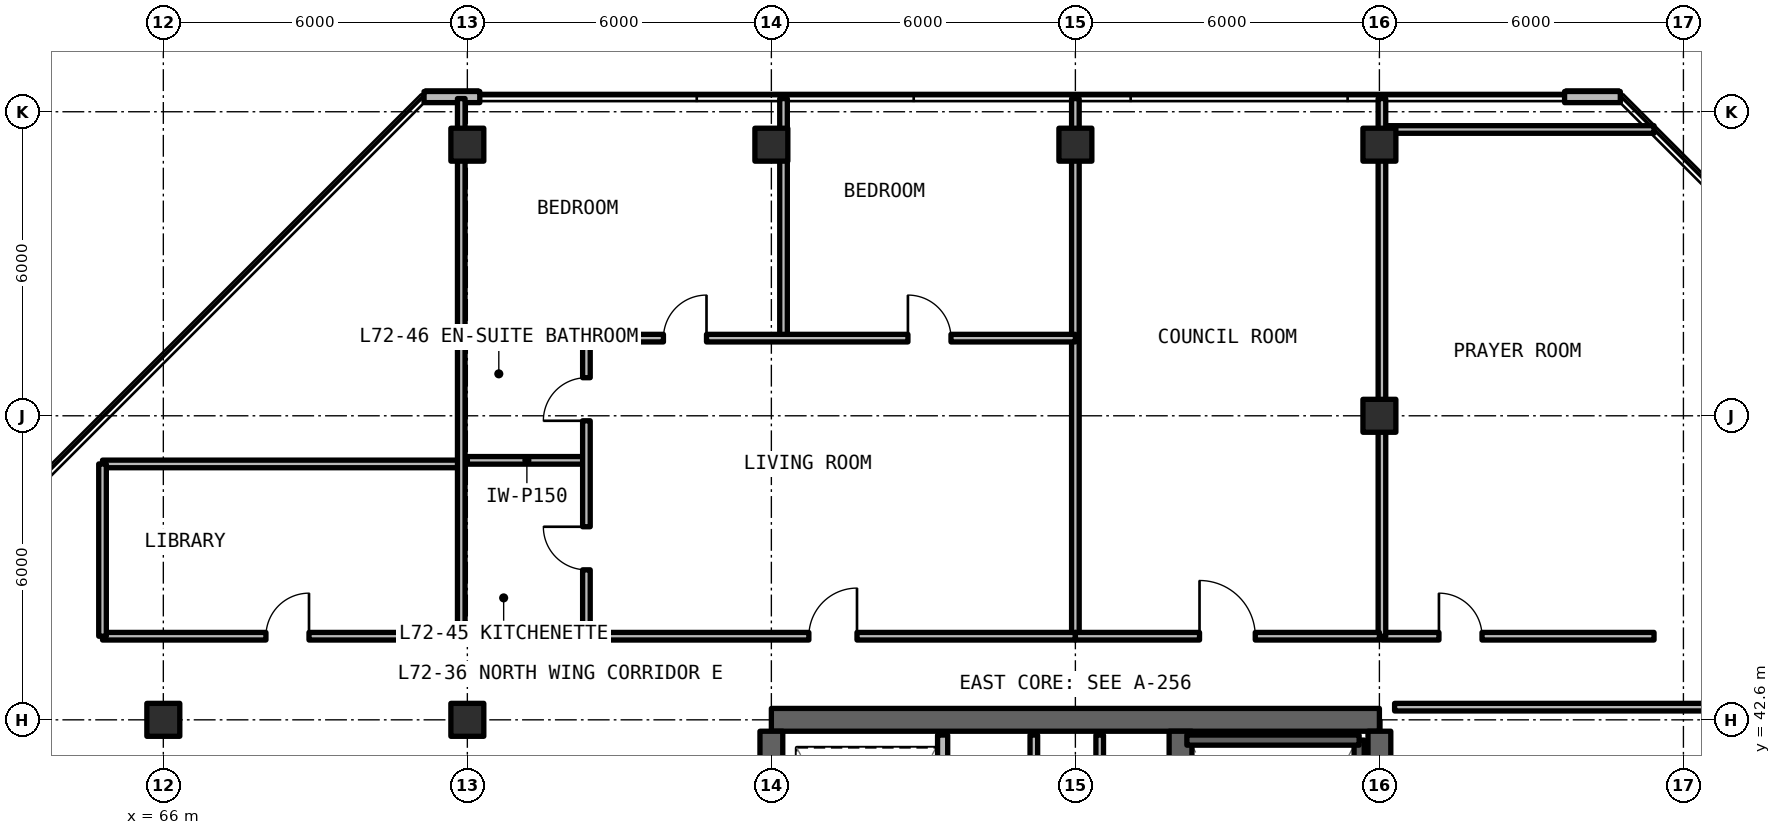
"""IFC4 building model, lengths in metres.
Left out: names, types, materials, properties, quantities, classifications, styles, units other than length and angle.
Written with IfcOpenShell. Run it as: python <this file> out.ifc"""

import sys

from ifc_helpers import new_model, si_unit, direction, frame, frame_2d, origin, origin_2d, place, context, subcontext, project, spatial, rectangle, extrude, element, fill, save


model = new_model("IFC4")
c1 = context("Model", 3, precision=1e-05, world=origin(), true_north=direction((0.0, 1.0)))
c2 = subcontext(c1, "Body", "Model", "MODEL_VIEW")
j1 = project(units=[si_unit("LENGTHUNIT", "METRE"), si_unit("PLANEANGLEUNIT", "RADIAN")], contexts=[c1])
p1 = place(None, origin())
s1 = spatial("IfcSite", under=j1, at=p1, CompositionType="ELEMENT")
p2 = place(p1, origin())
s2 = spatial("IfcBuilding", under=s1, at=p2, CompositionType="ELEMENT")
p3 = place(p2, frame((0.0, 0.0, 257.07)))
s3 = spatial("IfcBuildingStorey", under=s2, at=p3, CompositionType="ELEMENT", Elevation=257.07)
p4 = place(p3, frame((90.0, 42.6, 0.0), z_axis=(0.0, 0.0, 1.0), x_axis=(-1.0, 0.0, 0.0)))
e1 = element("IfcWall", 1, at=p4, inside=s3, PredefinedType="SHEAR", context=c2, shape_type="SweptSolid", body=[
    extrude(rectangle(XDim=12.0, YDim=0.45, at=frame_2d((6.0, 0.0))), origin(), (0.0, 0.0, 1.0), 3.63),
])
p5 = place(p3, frame((90.0, 24.825, 0.0), z_axis=(0.0, 0.0, 1.0), x_axis=(0.0, 1.0, 0.0)))
e2 = element("IfcWall", 2, at=p5, inside=s3, PredefinedType="SHEAR", context=c2, shape_type="SweptSolid", body=[
    extrude(rectangle(XDim=17.55, YDim=0.45, at=frame_2d((8.775, 0.0))), origin(), (0.0, 0.0, 1.0), 3.63),
])
p6 = place(p3, frame((78.0, 36.8, 0.0), z_axis=(0.0, 0.0, 1.0), x_axis=(0.0, 1.0, 0.0)))
e3 = element("IfcWall", 3, at=p6, inside=s3, PredefinedType="SHEAR", context=c2, shape_type="SweptSolid", body=[
    extrude(rectangle(XDim=5.575, YDim=0.45, at=frame_2d((2.788, 0.0))), origin(), (0.0, 0.0, 1.0), 3.63),
])
p7 = place(p3, frame((86.075, 24.825, 0.0), z_axis=(0.0, 0.0, 1.0), x_axis=(0.0, 1.0, 0.0)))
e4 = element("IfcWall", 4, at=p7, inside=s3, PredefinedType="SHEAR", context=c2, shape_type="SweptSolid", body=[
    extrude(rectangle(XDim=17.55, YDim=0.45, at=frame_2d((8.775, 0.0))), origin(), (0.0, 0.0, 1.0), 3.63),
])
p8 = place(p7, frame((0.425, 0.0, 0.0)))
e5 = element("IfcOpeningElement", 5, at=p8, cuts=e4, PredefinedType="OPENING", context=c2, shape_type="SweptSolid", body=[
    extrude(rectangle(XDim=1.15, YDim=2.15, at=frame_2d((0.575, 1.075))), frame((0.0, 0.235, 0.0), z_axis=(0.0, -1.0, 0.0), x_axis=(1.0, 0.0, 0.0)), (0.0, 0.0, 1.0), 0.47),
])
p9 = place(p7, frame((9.625, 0.0, 0.0)))
e6 = element("IfcOpeningElement", 6, at=p9, cuts=e4, PredefinedType="OPENING", context=c2, shape_type="SweptSolid", body=[
    extrude(rectangle(XDim=1.15, YDim=2.15, at=frame_2d((0.575, 1.075))), frame((0.0, 0.235, 0.0), z_axis=(0.0, -1.0, 0.0), x_axis=(1.0, 0.0, 0.0)), (0.0, 0.0, 1.0), 0.47),
])
for number, where, z_axis, x_axis in (
    (7, (66.0, 42.6, 0.0), (0.0, 0.0, 1.0), (1.0, 0.0, 0.0)),
    (8, (72.0, 42.6, 0.0), (0.0, 0.0, 1.0), (1.0, 0.0, 0.0)),
    (9, (90.0, 48.6, 0.0), (0.0, 0.0, 1.0), (1.0, 0.0, 0.0)),
    (10, (72.0, 53.95, 0.0), (0.0, 0.0, 1.0), (1.0, 0.0, 0.0)),
    (11, (78.0, 53.95, 0.0), (0.0, 0.0, 1.0), (1.0, 0.0, 0.0)),
    (12, (84.0, 53.95, 0.0), (0.0, 0.0, 1.0), (1.0, 0.0, 0.0)),
    (13, (90.0, 53.95, 0.0), (0.0, 0.0, 1.0), (1.0, 0.0, 0.0)),
):
    element("IfcColumn", number, at=place(p3, frame(where, z_axis=z_axis, x_axis=x_axis)), inside=s3, PredefinedType="COLUMN", context=c2, shape_type="SweptSolid", body=[
        extrude(rectangle(XDim=0.65, YDim=0.65, at=origin_2d()), origin(), (0.0, 0.0, 1.0), 3.63),
    ])
for number, where, z_axis, x_axis in (
    (14, (94.754, 54.89, 0.0), (0.0, 0.0, 1.0), (-1.0, 0.0, 0.0)),
    (15, (72.246, 54.89, 0.0), (0.0, 0.0, 1.0), (-1.0, 0.0, 0.0)),
):
    element("IfcWall", number, at=place(p3, frame(where, z_axis=z_axis, x_axis=x_axis)), inside=s3, PredefinedType="SOLIDWALL", context=c2, shape_type="SweptSolid", body=[
        extrude(rectangle(XDim=1.1, YDim=0.22, at=frame_2d((0.55, 0.0))), origin(), (0.0, 0.0, 1.0), 3.41),
    ])
p10 = place(p3, frame((84.48, 36.88, 0.0), z_axis=(0.0, 0.0, 1.0), x_axis=(0.0, 1.0, 0.0)))
e16 = element("IfcWall", 16, at=p10, inside=s3, PredefinedType="SOLIDWALL", context=c2, shape_type="SweptSolid", body=[
    extrude(rectangle(XDim=5.42, YDim=0.15, at=frame_2d((2.71, 0.0))), origin(), (0.0, 0.0, 1.0), 2.63),
])
p11 = place(p3, frame((83.18, 36.88, 0.0), z_axis=(0.0, 0.0, 1.0), x_axis=(0.0, 1.0, 0.0)))
e17 = element("IfcWall", 17, at=p11, inside=s3, PredefinedType="SOLIDWALL", context=c2, shape_type="SweptSolid", body=[
    extrude(rectangle(XDim=5.42, YDim=0.15, at=frame_2d((2.71, 0.0))), origin(), (0.0, 0.0, 1.0), 2.63),
])
p12 = place(p11, frame((2.1, 0.0, 0.0)))
e18 = element("IfcOpeningElement", 18, at=p12, cuts=e17, PredefinedType="OPENING", context=c2, shape_type="SweptSolid", body=[
    extrude(rectangle(XDim=0.95, YDim=2.15, at=frame_2d((0.475, 1.075))), frame((0.0, 0.085, 0.0), z_axis=(0.0, -1.0, 0.0), x_axis=(1.0, 0.0, 0.0)), (0.0, 0.0, 1.0), 0.17),
])
p13 = place(p3, frame((81.38, 36.88, 0.0), z_axis=(0.0, 0.0, 1.0), x_axis=(0.0, 1.0, 0.0)))
e19 = element("IfcWall", 19, at=p13, inside=s3, PredefinedType="SOLIDWALL", context=c2, shape_type="SweptSolid", body=[
    extrude(rectangle(XDim=5.42, YDim=0.2, at=frame_2d((2.71, 0.0))), origin(), (0.0, 0.0, 1.0), 2.63),
])
p14 = place(p13, frame((0.8, 0.0, 0.0)))
e20 = element("IfcOpeningElement", 20, at=p14, cuts=e19, PredefinedType="OPENING", context=c2, shape_type="SweptSolid", body=[
    extrude(rectangle(XDim=1.1, YDim=2.2, at=frame_2d((0.55, 1.1))), frame((0.0, 0.11, 0.0), z_axis=(0.0, -1.0, 0.0), x_axis=(1.0, 0.0, 0.0)), (0.0, 0.0, 1.0), 0.22),
])
p15 = place(p13, frame((3.3, 0.0, 0.0)))
e21 = element("IfcOpeningElement", 21, at=p15, cuts=e19, PredefinedType="OPENING", context=c2, shape_type="SweptSolid", body=[
    extrude(rectangle(XDim=1.1, YDim=2.2, at=frame_2d((0.55, 1.1))), frame((0.0, 0.11, 0.0), z_axis=(0.0, -1.0, 0.0), x_axis=(1.0, 0.0, 0.0)), (0.0, 0.0, 1.0), 0.22),
])
p16 = place(p3, frame((64.8, 44.25, 0.0), z_axis=(0.0, 0.0, 1.0), x_axis=(1.0, 0.0, 0.0)))
e22 = element("IfcWall", 22, at=p16, inside=s3, PredefinedType="SOLIDWALL", context=c2, shape_type="SweptSolid", body=[
    extrude(rectangle(XDim=7.08, YDim=0.15, at=frame_2d((3.54, 0.0))), origin(), (0.0, 0.0, 1.0), 2.63),
])
p17 = place(p16, frame((3.225, 0.0, 0.0)))
e23 = element("IfcOpeningElement", 23, at=p17, cuts=e22, PredefinedType="OPENING", context=c2, shape_type="SweptSolid", body=[
    extrude(rectangle(XDim=0.85, YDim=2.1, at=frame_2d((0.425, 1.05))), frame((0.0, 0.085, 0.0), z_axis=(0.0, -1.0, 0.0), x_axis=(1.0, 0.0, 0.0)), (0.0, 0.0, 1.0), 0.17),
])
p18 = place(p3, frame((64.8, 47.65, 0.0), z_axis=(0.0, 0.0, 1.0), x_axis=(1.0, 0.0, 0.0)))
e24 = element("IfcWall", 24, at=p18, inside=s3, PredefinedType="SOLIDWALL", context=c2, shape_type="SweptSolid", body=[
    extrude(rectangle(XDim=7.08, YDim=0.15, at=frame_2d((3.54, 0.0))), origin(), (0.0, 0.0, 1.0), 2.63),
])
p19 = place(p3, frame((64.8, 44.25, 0.0), z_axis=(0.0, 0.0, 1.0), x_axis=(0.0, 1.0, 0.0)))
e25 = element("IfcWall", 25, at=p19, inside=s3, PredefinedType="SOLIDWALL", context=c2, shape_type="SweptSolid", body=[
    extrude(rectangle(XDim=3.4, YDim=0.15, at=frame_2d((1.7, 0.0))), origin(), (0.0, 0.0, 1.0), 2.63),
])
p20 = place(p3, frame((71.88, 44.25, 0.0), z_axis=(0.0, 0.0, 1.0), x_axis=(0.0, 1.0, 0.0)))
e26 = element("IfcWall", 26, at=p20, inside=s3, PredefinedType="SOLIDWALL", context=c2, shape_type="SweptSolid", body=[
    extrude(rectangle(XDim=10.61, YDim=0.15, at=frame_2d((5.305, 0.0))), origin(), (0.0, 0.0, 1.0), 2.63),
])
p21 = place(p3, frame((90.3, 42.85, 0.0), z_axis=(0.0, 0.0, 1.0), x_axis=(1.0, 0.0, 0.0)))
e27 = element("IfcWall", 27, at=p21, inside=s3, PredefinedType="SOLIDWALL", context=c2, shape_type="SweptSolid", body=[
    extrude(rectangle(XDim=8.52, YDim=0.15, at=frame_2d((4.26, 0.0))), origin(), (0.0, 0.0, 1.0), 2.63),
])
p22 = place(p3, frame((90.05, 44.25, 0.0), z_axis=(0.0, 0.0, 1.0), x_axis=(1.0, 0.0, 0.0)))
e28 = element("IfcWall", 28, at=p22, inside=s3, PredefinedType="SOLIDWALL", context=c2, shape_type="SweptSolid", body=[
    extrude(rectangle(XDim=5.37, YDim=0.15, at=frame_2d((2.685, 0.0))), origin(), (0.0, 0.0, 1.0), 2.63),
])
p23 = place(p22, frame((1.125, 0.0, 0.0)))
e29 = element("IfcOpeningElement", 29, at=p23, cuts=e28, PredefinedType="OPENING", context=c2, shape_type="SweptSolid", body=[
    extrude(rectangle(XDim=0.85, YDim=2.1, at=frame_2d((0.425, 1.05))), frame((0.0, 0.085, 0.0), z_axis=(0.0, -1.0, 0.0), x_axis=(1.0, 0.0, 0.0)), (0.0, 0.0, 1.0), 0.17),
])
p24 = place(p3, frame((90.05, 54.25, 0.0), z_axis=(0.0, 0.0, 1.0), x_axis=(1.0, 0.0, 0.0)))
e30 = element("IfcWall", 30, at=p24, inside=s3, PredefinedType="SOLIDWALL", context=c2, shape_type="SweptSolid", body=[
    extrude(rectangle(XDim=5.37, YDim=0.15, at=frame_2d((2.685, 0.0))), origin(), (0.0, 0.0, 1.0), 2.63),
])
for number, where, z_axis, x_axis in (
    (31, (90.05, 44.25, 0.0), (0.0, 0.0, 1.0), (0.0, 1.0, 0.0)),
    (32, (84.0, 44.25, 0.0), (0.0, 0.0, 1.0), (0.0, 1.0, 0.0)),
):
    element("IfcWall", number, at=place(p3, frame(where, z_axis=z_axis, x_axis=x_axis)), inside=s3, PredefinedType="SOLIDWALL", context=c2, shape_type="SweptSolid", body=[
        extrude(rectangle(XDim=10.61, YDim=0.15, at=frame_2d((5.305, 0.0))), origin(), (0.0, 0.0, 1.0), 2.63),
    ])
p25 = place(p3, frame((72.0, 47.721, 0.0), z_axis=(0.0, 0.0, 1.0), x_axis=(1.0, 0.0, 0.0)))
e33 = element("IfcWall", 33, at=p25, inside=s3, PredefinedType="PARTITIONING", context=c2, shape_type="SweptSolid", body=[
    extrude(rectangle(XDim=2.35, YDim=0.15, at=frame_2d((1.175, 0.0))), origin(), (0.0, 0.0, 1.0), 2.63),
])
p26 = place(p3, frame((74.35, 44.25, 0.0), z_axis=(0.0, 0.0, 1.0), x_axis=(0.0, 1.0, 0.0)))
e34 = element("IfcWall", 34, at=p26, inside=s3, PredefinedType="PARTITIONING", context=c2, shape_type="SweptSolid", body=[
    extrude(rectangle(XDim=5.882, YDim=0.15, at=frame_2d((2.941, 0.0))), origin(), (0.0, 0.0, 1.0), 2.63),
])
p27 = place(p26, frame((1.31, 0.0, 0.0)))
e35 = element("IfcOpeningElement", 35, at=p27, cuts=e34, PredefinedType="OPENING", context=c2, shape_type="SweptSolid", body=[
    extrude(rectangle(XDim=0.85, YDim=2.1, at=frame_2d((0.425, 1.05))), frame((0.0, 0.085, 0.0), z_axis=(0.0, -1.0, 0.0), x_axis=(1.0, 0.0, 0.0)), (0.0, 0.0, 1.0), 0.17),
])
p28 = place(p26, frame((4.251, 0.0, 0.0)))
e36 = element("IfcOpeningElement", 36, at=p28, cuts=e34, PredefinedType="OPENING", context=c2, shape_type="SweptSolid", body=[
    extrude(rectangle(XDim=0.85, YDim=2.1, at=frame_2d((0.425, 1.05))), frame((0.0, 0.085, 0.0), z_axis=(0.0, -1.0, 0.0), x_axis=(1.0, 0.0, 0.0)), (0.0, 0.0, 1.0), 0.17),
])
p29 = place(p3, frame((78.24, 50.132, 0.0), z_axis=(0.0, 0.0, 1.0), x_axis=(0.0, 1.0, 0.0)))
e37 = element("IfcWall", 37, at=p29, inside=s3, PredefinedType="PARTITIONING", context=c2, shape_type="SweptSolid", body=[
    extrude(rectangle(XDim=4.728, YDim=0.15, at=frame_2d((2.364, 0.0))), origin(), (0.0, 0.0, 1.0), 2.63),
])
p30 = place(p3, frame((72.0, 50.132, 0.0), z_axis=(0.0, 0.0, 1.0), x_axis=(1.0, 0.0, 0.0)))
e38 = element("IfcWall", 38, at=p30, inside=s3, PredefinedType="PARTITIONING", context=c2, shape_type="SweptSolid", body=[
    extrude(rectangle(XDim=12.0, YDim=0.15, at=frame_2d((6.0, 0.0))), origin(), (0.0, 0.0, 1.0), 2.63),
])
p31 = place(p30, frame((3.87, 0.0, 0.0)))
e39 = element("IfcOpeningElement", 39, at=p31, cuts=e38, PredefinedType="OPENING", context=c2, shape_type="SweptSolid", body=[
    extrude(rectangle(XDim=0.85, YDim=2.1, at=frame_2d((0.425, 1.05))), frame((0.0, 0.085, 0.0), z_axis=(0.0, -1.0, 0.0), x_axis=(1.0, 0.0, 0.0)), (0.0, 0.0, 1.0), 0.17),
])
p32 = place(p30, frame((8.695, 0.0, 0.0)))
e40 = element("IfcOpeningElement", 40, at=p32, cuts=e38, PredefinedType="OPENING", context=c2, shape_type="SweptSolid", body=[
    extrude(rectangle(XDim=0.85, YDim=2.1, at=frame_2d((0.425, 1.05))), frame((0.0, 0.085, 0.0), z_axis=(0.0, -1.0, 0.0), x_axis=(1.0, 0.0, 0.0)), (0.0, 0.0, 1.0), 0.17),
])
p33 = place(p3, frame((72.0, 44.25, 0.0), z_axis=(0.0, 0.0, 1.0), x_axis=(1.0, 0.0, 0.0)))
e41 = element("IfcWall", 41, at=p33, inside=s3, PredefinedType="SOLIDWALL", context=c2, shape_type="SweptSolid", body=[
    extrude(rectangle(XDim=12.0, YDim=0.15, at=frame_2d((6.0, 0.0))), origin(), (0.0, 0.0, 1.0), 2.63),
])
p34 = place(p33, frame((6.74, 0.0, 0.0)))
e42 = element("IfcOpeningElement", 42, at=p34, cuts=e41, PredefinedType="OPENING", context=c2, shape_type="SweptSolid", body=[
    extrude(rectangle(XDim=0.95, YDim=2.15, at=frame_2d((0.475, 1.075))), frame((0.0, 0.085, 0.0), z_axis=(0.0, -1.0, 0.0), x_axis=(1.0, 0.0, 0.0)), (0.0, 0.0, 1.0), 0.17),
])
p35 = place(p3, frame((84.0, 44.25, 0.0), z_axis=(0.0, 0.0, 1.0), x_axis=(1.0, 0.0, 0.0)))
e43 = element("IfcWall", 43, at=p35, inside=s3, PredefinedType="SOLIDWALL", context=c2, shape_type="SweptSolid", body=[
    extrude(rectangle(XDim=6.0, YDim=0.15, at=frame_2d((3.0, 0.0))), origin(), (0.0, 0.0, 1.0), 2.63),
])
p36 = place(p35, frame((2.45, 0.0, 0.0)))
e44 = element("IfcOpeningElement", 44, at=p36, cuts=e43, PredefinedType="OPENING", context=c2, shape_type="SweptSolid", body=[
    extrude(rectangle(XDim=1.1, YDim=2.15, at=frame_2d((0.55, 1.075))), frame((0.0, 0.085, 0.0), z_axis=(0.0, -1.0, 0.0), x_axis=(1.0, 0.0, 0.0)), (0.0, 0.0, 1.0), 0.17),
])
p37 = place(p3, frame((89.6, 34.2, 0.0), z_axis=(0.0, 0.0, 1.0), x_axis=(0.0, 1.0, 0.0)))
e45 = element("IfcWall", 45, at=p37, inside=s3, PredefinedType="SOLIDWALL", context=c2, shape_type="SweptSolid", body=[
    extrude(rectangle(XDim=8.0, YDim=0.2, at=frame_2d((4.0, 0.0))), origin(), (0.0, 0.0, 1.0), 3.63),
])
p38 = place(p3, frame((89.6, 42.2, 0.0), z_axis=(0.0, 0.0, 1.0), x_axis=(-1.0, 0.0, 0.0)))
e46 = element("IfcWall", 46, at=p38, inside=s3, PredefinedType="SOLIDWALL", context=c2, shape_type="SweptSolid", body=[
    extrude(rectangle(XDim=3.4, YDim=0.2, at=frame_2d((1.7, 0.0))), origin(), (0.0, 0.0, 1.0), 3.63),
])
p39 = place(p17, origin())
e47 = element("IfcDoor", 47, at=p39, inside=s3, OperationType="SINGLE_SWING_RIGHT", PredefinedType="DOOR", context=c2, shape_type="SweptSolid", body=[
    extrude(rectangle(XDim=0.85, YDim=2.1, at=frame_2d((0.425, 1.05))), frame((0.0, 0.025, 0.0), z_axis=(0.0, -1.0, 0.0), x_axis=(1.0, 0.0, 0.0)), (0.0, 0.0, 1.0), 0.05),
])
fill(e23, e47)
p40 = place(p23, origin())
e48 = element("IfcDoor", 48, at=p40, inside=s3, OperationType="SINGLE_SWING_LEFT", PredefinedType="DOOR", context=c2, shape_type="SweptSolid", body=[
    extrude(rectangle(XDim=0.85, YDim=2.1, at=frame_2d((0.425, 1.05))), frame((0.0, 0.025, 0.0), z_axis=(0.0, -1.0, 0.0), x_axis=(1.0, 0.0, 0.0)), (0.0, 0.0, 1.0), 0.05),
])
fill(e29, e48)
p41 = place(p27, origin())
e49 = element("IfcDoor", 49, at=p41, inside=s3, OperationType="SINGLE_SWING_RIGHT", PredefinedType="DOOR", context=c2, shape_type="SweptSolid", body=[
    extrude(rectangle(XDim=0.85, YDim=2.1, at=frame_2d((0.425, 1.05))), frame((0.0, 0.025, 0.0), z_axis=(0.0, -1.0, 0.0), x_axis=(1.0, 0.0, 0.0)), (0.0, 0.0, 1.0), 0.05),
])
fill(e35, e49)
p42 = place(p28, origin())
e50 = element("IfcDoor", 50, at=p42, inside=s3, OperationType="SINGLE_SWING_LEFT", PredefinedType="DOOR", context=c2, shape_type="SweptSolid", body=[
    extrude(rectangle(XDim=0.85, YDim=2.1, at=frame_2d((0.425, 1.05))), frame((0.0, 0.025, 0.0), z_axis=(0.0, -1.0, 0.0), x_axis=(1.0, 0.0, 0.0)), (0.0, 0.0, 1.0), 0.05),
])
fill(e36, e50)
p43 = place(p31, origin())
e51 = element("IfcDoor", 51, at=p43, inside=s3, OperationType="SINGLE_SWING_RIGHT", PredefinedType="DOOR", context=c2, shape_type="SweptSolid", body=[
    extrude(rectangle(XDim=0.85, YDim=2.1, at=frame_2d((0.425, 1.05))), frame((0.0, 0.025, 0.0), z_axis=(0.0, -1.0, 0.0), x_axis=(1.0, 0.0, 0.0)), (0.0, 0.0, 1.0), 0.05),
])
fill(e39, e51)
p44 = place(p32, origin())
e52 = element("IfcDoor", 52, at=p44, inside=s3, OperationType="SINGLE_SWING_LEFT", PredefinedType="DOOR", context=c2, shape_type="SweptSolid", body=[
    extrude(rectangle(XDim=0.85, YDim=2.1, at=frame_2d((0.425, 1.05))), frame((0.0, 0.025, 0.0), z_axis=(0.0, -1.0, 0.0), x_axis=(1.0, 0.0, 0.0)), (0.0, 0.0, 1.0), 0.05),
])
fill(e40, e52)
p45 = place(p34, origin())
e53 = element("IfcDoor", 53, at=p45, inside=s3, OperationType="SINGLE_SWING_RIGHT", PredefinedType="DOOR", context=c2, shape_type="SweptSolid", body=[
    extrude(rectangle(XDim=0.95, YDim=2.15, at=frame_2d((0.475, 1.075))), frame((0.0, 0.025, 0.0), z_axis=(0.0, -1.0, 0.0), x_axis=(1.0, 0.0, 0.0)), (0.0, 0.0, 1.0), 0.05),
])
fill(e42, e53)
p46 = place(p36, origin())
e54 = element("IfcDoor", 54, at=p46, inside=s3, OperationType="SINGLE_SWING_LEFT", PredefinedType="DOOR", context=c2, shape_type="SweptSolid", body=[
    extrude(rectangle(XDim=1.1, YDim=2.15, at=frame_2d((0.55, 1.075))), frame((0.0, 0.025, 0.0), z_axis=(0.0, -1.0, 0.0), x_axis=(1.0, 0.0, 0.0)), (0.0, 0.0, 1.0), 0.05),
])
fill(e44, e54)
save(model, sys.argv[1])
